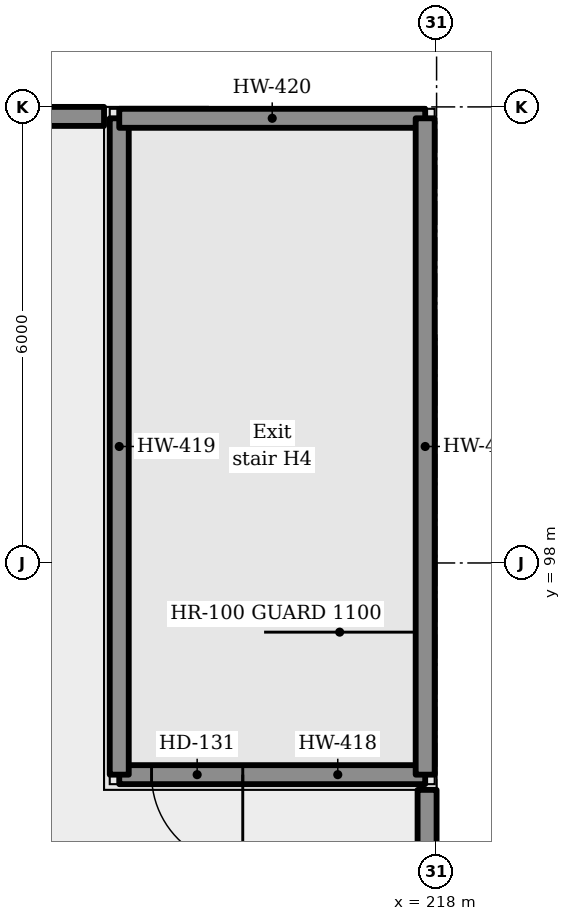
"""IFC4 building model, lengths in metres.
Left out: names, types, materials, properties, quantities, classifications, styles, units other than length and angle.
Written with IfcOpenShell. Run it as: python <this file> out.ifc"""

import sys

from ifc_helpers import new_model, si_unit, direction, frame, frame_2d, origin, place, context, subcontext, project, spatial, rectangle, extrude, element, fill, save


model = new_model("IFC4")
c1 = context("Model", 3, precision=1e-05, world=origin(), true_north=direction((0.0, 1.0)))
c2 = subcontext(c1, "Body", "Model", "MODEL_VIEW")
j1 = project(units=[si_unit("LENGTHUNIT", "METRE"), si_unit("PLANEANGLEUNIT", "RADIAN")], contexts=[c1])
p1 = place(None, origin())
s1 = spatial("IfcSite", under=j1, at=p1, CompositionType="ELEMENT")
p2 = place(p1, origin())
s2 = spatial("IfcBuilding", under=s1, at=p2, CompositionType="ELEMENT")
p3 = place(p2, frame((0.0, 0.0, 19.8)))
s3 = spatial("IfcBuildingStorey", under=s2, at=p3, CompositionType="ELEMENT", Elevation=19.8)
p4 = place(p3, frame((156.375, 103.875, 0.0), z_axis=(0.0, 0.0, 1.0), x_axis=(1.0, 0.0, 0.0)))
e1 = element("IfcWall", 1, at=p4, inside=s3, PredefinedType="PARAPET", context=c2, shape_type="SweptSolid", body=[
    extrude(rectangle(XDim=57.25, YDim=0.25, at=frame_2d((28.625, 0.0))), origin(), (0.0, 0.0, 1.0), 1.1),
])
p5 = place(p3, frame((217.875, 95.015, 0.0), z_axis=(0.0, 0.0, 1.0), x_axis=(0.0, -1.0, 0.0)))
e2 = element("IfcWall", 2, at=p5, inside=s3, PredefinedType="PARAPET", context=c2, shape_type="SweptSolid", body=[
    extrude(rectangle(XDim=30.03, YDim=0.25, at=frame_2d((15.015, 0.0))), origin(), (0.0, 0.0, 1.0), 1.1),
])
p6 = place(p3, frame((217.85, 95.215, 0.0), z_axis=(0.0, 0.0, 1.0), x_axis=(-1.0, 0.0, 0.0)))
e3 = element("IfcWall", 3, at=p6, inside=s3, PredefinedType="SOLIDWALL", context=c2, shape_type="SweptSolid", body=[
    extrude(rectangle(XDim=4.025, YDim=0.25, at=frame_2d((2.013, 0.0))), origin(), (0.0, 0.0, 1.0), 2.75),
])
p7 = place(p6, frame((2.4, 0.0, 0.0)))
e4 = element("IfcOpeningElement", 4, at=p7, cuts=e3, PredefinedType="OPENING", context=c2, shape_type="SweptSolid", body=[
    extrude(rectangle(XDim=1.2, YDim=2.1, at=frame_2d((0.6, 1.05))), frame((0.0, 0.135, 0.0), z_axis=(0.0, -1.0, 0.0), x_axis=(1.0, 0.0, 0.0)), (0.0, 0.0, 1.0), 0.27),
])
p8 = place(p3, frame((213.825, 95.215, 0.0), z_axis=(0.0, 0.0, 1.0), x_axis=(0.0, 1.0, 0.0)))
e5 = element("IfcWall", 5, at=p8, inside=s3, PredefinedType="SOLIDWALL", context=c2, shape_type="SweptSolid", body=[
    extrude(rectangle(XDim=8.635, YDim=0.25, at=frame_2d((4.317, 0.0))), origin(), (0.0, 0.0, 1.0), 2.75),
])
p9 = place(p3, frame((213.825, 103.85, 0.0), z_axis=(0.0, 0.0, 1.0), x_axis=(1.0, 0.0, 0.0)))
e6 = element("IfcWall", 6, at=p9, inside=s3, PredefinedType="SOLIDWALL", context=c2, shape_type="SweptSolid", body=[
    extrude(rectangle(XDim=4.025, YDim=0.25, at=frame_2d((2.013, 0.0))), origin(), (0.0, 0.0, 1.0), 2.75),
])
p10 = place(p3, frame((217.85, 103.85, 0.0), z_axis=(0.0, 0.0, 1.0), x_axis=(0.0, -1.0, 0.0)))
e7 = element("IfcWall", 7, at=p10, inside=s3, PredefinedType="SOLIDWALL", context=c2, shape_type="SweptSolid", body=[
    extrude(rectangle(XDim=8.635, YDim=0.25, at=frame_2d((4.317, 0.0))), origin(), (0.0, 0.0, 1.0), 2.75),
])
p11 = place(p7, frame((1.2, 0.0, 0.0), z_axis=(0.0, 0.0, 1.0), x_axis=(-1.0, 0.0, 0.0)))
e8 = element("IfcDoor", 8, at=p11, inside=s3, OperationType="SINGLE_SWING_LEFT", PredefinedType="DOOR", context=c2, shape_type="SweptSolid", body=[
    extrude(rectangle(XDim=1.2, YDim=2.1, at=frame_2d((0.6, 1.05))), frame((0.0, 0.025, 0.0), z_axis=(0.0, -1.0, 0.0), x_axis=(1.0, 0.0, 0.0)), (0.0, 0.0, 1.0), 0.05),
])
fill(e4, e8)
save(model, sys.argv[1])
